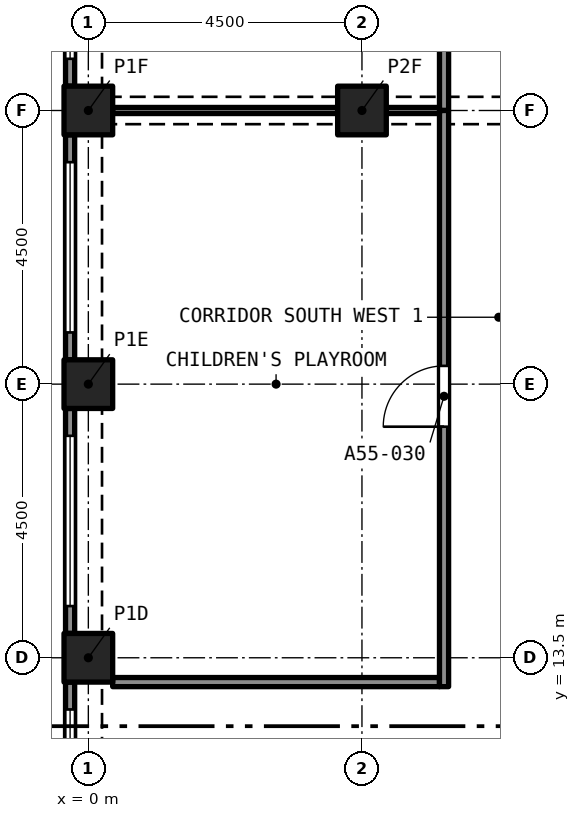
"""IFC4 building model, lengths in metres.
Left out: names, types, materials, properties, quantities, classifications, styles, units other than length and angle.
Written with IfcOpenShell. Run it as: python <this file> out.ifc"""

import sys

from ifc_helpers import new_model, si_unit, direction, frame, frame_2d, origin, origin_2d, place, context, subcontext, project, spatial, rectangle, extrude, element, fill, save


model = new_model("IFC4")
c1 = context("Model", 3, precision=1e-05, world=origin(), true_north=direction((0.0, 1.0)))
c2 = subcontext(c1, "Body", "Model", "MODEL_VIEW")
j1 = project(units=[si_unit("LENGTHUNIT", "METRE"), si_unit("PLANEANGLEUNIT", "RADIAN")], contexts=[c1])
p1 = place(None, origin())
s1 = spatial("IfcSite", under=j1, at=p1, CompositionType="ELEMENT")
p2 = place(p1, origin())
s2 = spatial("IfcBuilding", under=s1, at=p2, CompositionType="ELEMENT")
p3 = place(p2, frame((0.0, 0.0, 198.7)))
s3 = spatial("IfcBuildingStorey", under=s2, at=p3, CompositionType="ELEMENT", Elevation=198.7)
for number, where, z_axis, x_axis in (
    (1, (0.0, 13.5, 0.0), (0.0, 0.0, 1.0), (1.0, 0.0, 0.0)),
    (2, (0.0, 18.0, 0.0), (0.0, 0.0, 1.0), (1.0, 0.0, 0.0)),
    (3, (0.0, 22.5, 0.0), (0.0, 0.0, 1.0), (1.0, 0.0, 0.0)),
    (4, (4.5, 22.5, 0.0), (0.0, 0.0, 1.0), (1.0, 0.0, 0.0)),
):
    element("IfcColumn", number, at=place(p3, frame(where, z_axis=z_axis, x_axis=x_axis)), inside=s3, PredefinedType="COLUMN", context=c2, shape_type="SweptSolid", body=[
        extrude(rectangle(XDim=0.8, YDim=0.8, at=origin_2d()), origin(), (0.0, 0.0, 1.0), 3.2),
    ])
p4 = place(p3, frame((-0.3, 22.9, 0.0), z_axis=(0.0, 0.0, 1.0), x_axis=(0.0, 1.0, 0.0)))
e5 = element("IfcWall", 5, at=p4, inside=s3, PredefinedType="SOLIDWALL", context=c2, shape_type="SweptSolid", body=[
    extrude(rectangle(XDim=3.7, YDim=0.15, at=frame_2d((1.85, 0.0))), origin(), (0.0, 0.0, 1.0), 3.2),
])
p5 = place(p4, frame((0.45, 0.0, 0.45)))
e6 = element("IfcOpeningElement", 6, at=p5, cuts=e5, PredefinedType="OPENING", context=c2, shape_type="SweptSolid", body=[
    extrude(rectangle(XDim=2.8, YDim=1.95, at=frame_2d((1.4, 0.975))), frame((0.0, 0.085, 0.0), z_axis=(0.0, -1.0, 0.0), x_axis=(1.0, 0.0, 0.0)), (0.0, 0.0, 1.0), 0.17),
])
p6 = place(p3, frame((-0.3, 18.4, 0.0), z_axis=(0.0, 0.0, 1.0), x_axis=(0.0, 1.0, 0.0)))
e7 = element("IfcWall", 7, at=p6, inside=s3, PredefinedType="SOLIDWALL", context=c2, shape_type="SweptSolid", body=[
    extrude(rectangle(XDim=3.7, YDim=0.15, at=frame_2d((1.85, 0.0))), origin(), (0.0, 0.0, 1.0), 3.2),
])
p7 = place(p6, frame((0.45, 0.0, 0.45)))
e8 = element("IfcOpeningElement", 8, at=p7, cuts=e7, PredefinedType="OPENING", context=c2, shape_type="SweptSolid", body=[
    extrude(rectangle(XDim=2.8, YDim=1.95, at=frame_2d((1.4, 0.975))), frame((0.0, 0.085, 0.0), z_axis=(0.0, -1.0, 0.0), x_axis=(1.0, 0.0, 0.0)), (0.0, 0.0, 1.0), 0.17),
])
p8 = place(p3, frame((-0.3, 13.9, 0.0), z_axis=(0.0, 0.0, 1.0), x_axis=(0.0, 1.0, 0.0)))
e9 = element("IfcWall", 9, at=p8, inside=s3, PredefinedType="SOLIDWALL", context=c2, shape_type="SweptSolid", body=[
    extrude(rectangle(XDim=3.7, YDim=0.15, at=frame_2d((1.85, 0.0))), origin(), (0.0, 0.0, 1.0), 3.2),
])
p9 = place(p8, frame((0.45, 0.0, 0.45)))
e10 = element("IfcOpeningElement", 10, at=p9, cuts=e9, PredefinedType="OPENING", context=c2, shape_type="SweptSolid", body=[
    extrude(rectangle(XDim=2.8, YDim=1.95, at=frame_2d((1.4, 0.975))), frame((0.0, 0.085, 0.0), z_axis=(0.0, -1.0, 0.0), x_axis=(1.0, 0.0, 0.0)), (0.0, 0.0, 1.0), 0.17),
])
p10 = place(p3, frame((-0.3, 9.4, 0.0), z_axis=(0.0, 0.0, 1.0), x_axis=(0.0, 1.0, 0.0)))
e11 = element("IfcWall", 11, at=p10, inside=s3, PredefinedType="SOLIDWALL", context=c2, shape_type="SweptSolid", body=[
    extrude(rectangle(XDim=3.7, YDim=0.15, at=frame_2d((1.85, 0.0))), origin(), (0.0, 0.0, 1.0), 3.2),
])
p11 = place(p10, frame((0.45, 0.0, 0.45)))
e12 = element("IfcOpeningElement", 12, at=p11, cuts=e11, PredefinedType="OPENING", context=c2, shape_type="SweptSolid", body=[
    extrude(rectangle(XDim=2.8, YDim=1.95, at=frame_2d((1.4, 0.975))), frame((0.0, 0.085, 0.0), z_axis=(0.0, -1.0, 0.0), x_axis=(1.0, 0.0, 0.0)), (0.0, 0.0, 1.0), 0.17),
])
p12 = place(p3, frame((0.4, 13.1, 0.0), z_axis=(0.0, 0.0, 1.0), x_axis=(1.0, 0.0, 0.0)))
e13 = element("IfcWall", 13, at=p12, inside=s3, PredefinedType="PARTITIONING", context=c2, shape_type="SweptSolid", body=[
    extrude(rectangle(XDim=5.375, YDim=0.15, at=frame_2d((2.688, 0.0))), origin(), (0.0, 0.0, 1.0), 2.7),
])
p13 = place(p3, frame((5.85, 22.5, 0.0), z_axis=(0.0, 0.0, 1.0), x_axis=(0.0, 1.0, 0.0)))
e14 = element("IfcWall", 14, at=p13, inside=s3, PredefinedType="PARTITIONING", context=c2, shape_type="SweptSolid", body=[
    extrude(rectangle(XDim=3.075, YDim=0.15, at=frame_2d((1.538, 0.0))), origin(), (0.0, 0.0, 1.0), 2.7),
])
p14 = place(p3, frame((5.85, 13.025, 0.0), z_axis=(0.0, 0.0, 1.0), x_axis=(0.0, 1.0, 0.0)))
e15 = element("IfcWall", 15, at=p14, inside=s3, PredefinedType="PARTITIONING", context=c2, shape_type="SweptSolid", body=[
    extrude(rectangle(XDim=9.475, YDim=0.15, at=frame_2d((4.738, 0.0))), origin(), (0.0, 0.0, 1.0), 2.7),
])
p15 = place(p14, frame((4.275, 0.0, 0.0)))
e16 = element("IfcOpeningElement", 16, at=p15, cuts=e15, PredefinedType="OPENING", context=c2, shape_type="SweptSolid", body=[
    extrude(rectangle(XDim=1.0, YDim=2.1, at=frame_2d((0.5, 1.05))), frame((0.0, 0.085, 0.0), z_axis=(0.0, -1.0, 0.0), x_axis=(1.0, 0.0, 0.0)), (0.0, 0.0, 1.0), 0.17),
])
p16 = place(p3, frame((4.9, 22.5, 0.0), z_axis=(0.0, 0.0, 1.0), x_axis=(1.0, 0.0, 0.0)))
e17 = element("IfcWall", 17, at=p16, inside=s3, PredefinedType="PARTITIONING", context=c2, shape_type="SweptSolid", body=[
    extrude(rectangle(XDim=0.875, YDim=0.1, at=frame_2d((0.438, 0.0))), origin(), (0.0, 0.0, 1.0), 2.38),
])
p17 = place(p3, frame((0.4, 22.5, 0.0), z_axis=(0.0, 0.0, 1.0), x_axis=(1.0, 0.0, 0.0)))
e18 = element("IfcWall", 18, at=p17, inside=s3, PredefinedType="PARTITIONING", context=c2, shape_type="SweptSolid", body=[
    extrude(rectangle(XDim=3.7, YDim=0.1, at=frame_2d((1.85, 0.0))), origin(), (0.0, 0.0, 1.0), 2.38),
])
p18 = place(p5, origin())
e19 = element("IfcWindow", 19, at=p18, inside=s3, PartitioningType="SINGLE_PANEL", PredefinedType="WINDOW", context=c2, shape_type="SweptSolid", body=[
    extrude(rectangle(XDim=2.8, YDim=1.95, at=frame_2d((1.4, 0.975))), frame((0.0, 0.03, 0.0), z_axis=(0.0, -1.0, 0.0), x_axis=(1.0, 0.0, 0.0)), (0.0, 0.0, 1.0), 0.06),
])
fill(e6, e19)
p19 = place(p7, origin())
e20 = element("IfcWindow", 20, at=p19, inside=s3, PartitioningType="SINGLE_PANEL", PredefinedType="WINDOW", context=c2, shape_type="SweptSolid", body=[
    extrude(rectangle(XDim=2.8, YDim=1.95, at=frame_2d((1.4, 0.975))), frame((0.0, 0.03, 0.0), z_axis=(0.0, -1.0, 0.0), x_axis=(1.0, 0.0, 0.0)), (0.0, 0.0, 1.0), 0.06),
])
fill(e8, e20)
p20 = place(p9, origin())
e21 = element("IfcWindow", 21, at=p20, inside=s3, PartitioningType="SINGLE_PANEL", PredefinedType="WINDOW", context=c2, shape_type="SweptSolid", body=[
    extrude(rectangle(XDim=2.8, YDim=1.95, at=frame_2d((1.4, 0.975))), frame((0.0, 0.03, 0.0), z_axis=(0.0, -1.0, 0.0), x_axis=(1.0, 0.0, 0.0)), (0.0, 0.0, 1.0), 0.06),
])
fill(e10, e21)
p21 = place(p11, origin())
e22 = element("IfcWindow", 22, at=p21, inside=s3, PartitioningType="SINGLE_PANEL", PredefinedType="WINDOW", context=c2, shape_type="SweptSolid", body=[
    extrude(rectangle(XDim=2.8, YDim=1.95, at=frame_2d((1.4, 0.975))), frame((0.0, 0.03, 0.0), z_axis=(0.0, -1.0, 0.0), x_axis=(1.0, 0.0, 0.0)), (0.0, 0.0, 1.0), 0.06),
])
fill(e12, e22)
p22 = place(p15, origin())
e23 = element("IfcDoor", 23, at=p22, inside=s3, OperationType="SINGLE_SWING_RIGHT", PredefinedType="DOOR", context=c2, shape_type="SweptSolid", body=[
    extrude(rectangle(XDim=1.0, YDim=2.1, at=frame_2d((0.5, 1.05))), frame((0.0, 0.025, 0.0), z_axis=(0.0, -1.0, 0.0), x_axis=(1.0, 0.0, 0.0)), (0.0, 0.0, 1.0), 0.05),
])
fill(e16, e23)
save(model, sys.argv[1])
